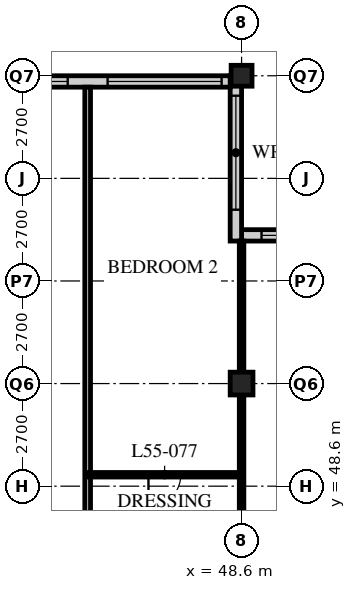
"""IFC4 building model, lengths in metres.
Left out: names, types, materials, properties, quantities, classifications, styles, units other than length and angle.
Written with IfcOpenShell. Run it as: python <this file> out.ifc"""

import sys

from ifc_helpers import new_model, si_unit, direction, frame, frame_2d, origin, origin_2d, place, context, subcontext, project, spatial, rectangle, hollow_rectangle, extrude, element, fill, save


model = new_model("IFC4")
c1 = context("Model", 3, precision=1e-05, world=origin(), true_north=direction((0.0, 1.0)))
c2 = subcontext(c1, "Body", "Model", "MODEL_VIEW")
j1 = project(units=[si_unit("LENGTHUNIT", "METRE"), si_unit("PLANEANGLEUNIT", "RADIAN")], contexts=[c1])
p1 = place(None, origin())
s1 = spatial("IfcSite", under=j1, at=p1, CompositionType="ELEMENT")
p2 = place(p1, origin())
s2 = spatial("IfcBuilding", under=s1, at=p2, CompositionType="ELEMENT")
p3 = place(p2, frame((0.0, 0.0, 213.6)))
s3 = spatial("IfcBuildingStorey", under=s2, at=p3, CompositionType="ELEMENT", Elevation=213.6)
p4 = place(p3, frame((48.6, 51.3, 0.0), z_axis=(0.0, 0.0, 1.0), x_axis=(1.0, 0.0, 0.0)))
e1 = element("IfcColumn", 1, at=p4, inside=s3, PredefinedType="COLUMN", context=c2, shape_type="SweptSolid", body=[
    extrude(hollow_rectangle(XDim=0.6, YDim=0.6, WallThickness=0.05, at=origin_2d()), origin(), (0.0, 0.0, 1.0), 3.6),
])
p5 = place(p3, frame((48.6, 59.4, 0.0), z_axis=(0.0, 0.0, 1.0), x_axis=(1.0, 0.0, 0.0)))
e2 = element("IfcColumn", 2, at=p5, inside=s3, PredefinedType="COLUMN", context=c2, shape_type="SweptSolid", body=[
    extrude(hollow_rectangle(XDim=0.55, YDim=0.55, WallThickness=0.045, at=origin_2d()), origin(), (0.0, 0.0, 1.0), 3.6),
])
p6 = place(p3, frame((52.35, 55.2, 0.0), z_axis=(0.0, 0.0, 1.0), x_axis=(-1.0, 0.0, 0.0)))
e3 = element("IfcWall", 3, at=p6, inside=s3, PredefinedType="SOLIDWALL", context=c2, shape_type="SweptSolid", body=[
    extrude(rectangle(XDim=3.75, YDim=0.3, at=frame_2d((1.875, 0.0))), origin(), (0.0, 0.0, 1.0), 3.39),
])
p7 = place(p6, frame((0.225, 0.0, 0.6)))
e4 = element("IfcOpeningElement", 4, at=p7, cuts=e3, PredefinedType="OPENING", context=c2, shape_type="SweptSolid", body=[
    extrude(rectangle(XDim=3.0, YDim=2.0, at=frame_2d((1.5, 1.0))), frame((0.0, 0.16, 0.0), z_axis=(0.0, -1.0, 0.0), x_axis=(1.0, 0.0, 0.0)), (0.0, 0.0, 1.0), 0.32),
])
p8 = place(p3, frame((48.45, 55.05, 0.0), z_axis=(0.0, 0.0, 1.0), x_axis=(0.0, 1.0, 0.0)))
e5 = element("IfcWall", 5, at=p8, inside=s3, PredefinedType="SOLIDWALL", context=c2, shape_type="SweptSolid", body=[
    extrude(rectangle(XDim=4.35, YDim=0.3, at=frame_2d((2.175, 0.0))), origin(), (0.0, 0.0, 1.0), 3.39),
])
p9 = place(p8, frame((0.825, 0.0, 0.6)))
e6 = element("IfcOpeningElement", 6, at=p9, cuts=e5, PredefinedType="OPENING", context=c2, shape_type="SweptSolid", body=[
    extrude(rectangle(XDim=3.0, YDim=2.0, at=frame_2d((1.5, 1.0))), frame((0.0, 0.16, 0.0), z_axis=(0.0, -1.0, 0.0), x_axis=(1.0, 0.0, 0.0)), (0.0, 0.0, 1.0), 0.32),
])
p10 = place(p3, frame((48.3, 59.25, 0.0), z_axis=(0.0, 0.0, 1.0), x_axis=(-1.0, 0.0, 0.0)))
e7 = element("IfcWall", 7, at=p10, inside=s3, PredefinedType="SOLIDWALL", context=c2, shape_type="SweptSolid", body=[
    extrude(rectangle(XDim=40.2, YDim=0.3, at=frame_2d((20.1, 0.0))), origin(), (0.0, 0.0, 1.0), 3.39),
])
p11 = place(p10, frame((0.225, 0.0, 0.6)))
e8 = element("IfcOpeningElement", 8, at=p11, cuts=e7, PredefinedType="OPENING", context=c2, shape_type="SweptSolid", body=[
    extrude(rectangle(XDim=3.0, YDim=2.4, at=frame_2d((1.5, 1.2))), frame((0.0, 0.16, 0.0), z_axis=(0.0, -1.0, 0.0), x_axis=(1.0, 0.0, 0.0)), (0.0, 0.0, 1.0), 0.32),
])
p12 = place(p10, frame((4.275, 0.0, 0.6)))
e9 = element("IfcOpeningElement", 9, at=p12, cuts=e7, PredefinedType="OPENING", context=c2, shape_type="SweptSolid", body=[
    extrude(rectangle(XDim=3.0, YDim=2.4, at=frame_2d((1.5, 1.2))), frame((0.0, 0.16, 0.0), z_axis=(0.0, -1.0, 0.0), x_axis=(1.0, 0.0, 0.0)), (0.0, 0.0, 1.0), 0.32),
])
p13 = place(p10, frame((8.325, 0.0, 0.6)))
e10 = element("IfcOpeningElement", 10, at=p13, cuts=e7, PredefinedType="OPENING", context=c2, shape_type="SweptSolid", body=[
    extrude(rectangle(XDim=3.0, YDim=2.4, at=frame_2d((1.5, 1.2))), frame((0.0, 0.16, 0.0), z_axis=(0.0, -1.0, 0.0), x_axis=(1.0, 0.0, 0.0)), (0.0, 0.0, 1.0), 0.32),
])
p14 = place(p10, frame((12.375, 0.0, 0.6)))
e11 = element("IfcOpeningElement", 11, at=p14, cuts=e7, PredefinedType="OPENING", context=c2, shape_type="SweptSolid", body=[
    extrude(rectangle(XDim=3.0, YDim=2.4, at=frame_2d((1.5, 1.2))), frame((0.0, 0.16, 0.0), z_axis=(0.0, -1.0, 0.0), x_axis=(1.0, 0.0, 0.0)), (0.0, 0.0, 1.0), 0.32),
])
p15 = place(p10, frame((16.425, 0.0, 0.6)))
e12 = element("IfcOpeningElement", 12, at=p15, cuts=e7, PredefinedType="OPENING", context=c2, shape_type="SweptSolid", body=[
    extrude(rectangle(XDim=3.0, YDim=2.4, at=frame_2d((1.5, 1.2))), frame((0.0, 0.16, 0.0), z_axis=(0.0, -1.0, 0.0), x_axis=(1.0, 0.0, 0.0)), (0.0, 0.0, 1.0), 0.32),
])
p16 = place(p10, frame((20.475, 0.0, 0.6)))
e13 = element("IfcOpeningElement", 13, at=p16, cuts=e7, PredefinedType="OPENING", context=c2, shape_type="SweptSolid", body=[
    extrude(rectangle(XDim=3.0, YDim=2.4, at=frame_2d((1.5, 1.2))), frame((0.0, 0.16, 0.0), z_axis=(0.0, -1.0, 0.0), x_axis=(1.0, 0.0, 0.0)), (0.0, 0.0, 1.0), 0.32),
])
p17 = place(p10, frame((24.525, 0.0, 0.6)))
e14 = element("IfcOpeningElement", 14, at=p17, cuts=e7, PredefinedType="OPENING", context=c2, shape_type="SweptSolid", body=[
    extrude(rectangle(XDim=3.0, YDim=2.4, at=frame_2d((1.5, 1.2))), frame((0.0, 0.16, 0.0), z_axis=(0.0, -1.0, 0.0), x_axis=(1.0, 0.0, 0.0)), (0.0, 0.0, 1.0), 0.32),
])
p18 = place(p10, frame((28.575, 0.0, 0.6)))
e15 = element("IfcOpeningElement", 15, at=p18, cuts=e7, PredefinedType="OPENING", context=c2, shape_type="SweptSolid", body=[
    extrude(rectangle(XDim=3.0, YDim=2.4, at=frame_2d((1.5, 1.2))), frame((0.0, 0.16, 0.0), z_axis=(0.0, -1.0, 0.0), x_axis=(1.0, 0.0, 0.0)), (0.0, 0.0, 1.0), 0.32),
])
p19 = place(p10, frame((32.625, 0.0, 0.6)))
e16 = element("IfcOpeningElement", 16, at=p19, cuts=e7, PredefinedType="OPENING", context=c2, shape_type="SweptSolid", body=[
    extrude(rectangle(XDim=3.0, YDim=2.4, at=frame_2d((1.5, 1.2))), frame((0.0, 0.16, 0.0), z_axis=(0.0, -1.0, 0.0), x_axis=(1.0, 0.0, 0.0)), (0.0, 0.0, 1.0), 0.32),
])
p20 = place(p10, frame((36.675, 0.0, 0.6)))
e17 = element("IfcOpeningElement", 17, at=p20, cuts=e7, PredefinedType="OPENING", context=c2, shape_type="SweptSolid", body=[
    extrude(rectangle(XDim=3.0, YDim=2.4, at=frame_2d((1.5, 1.2))), frame((0.0, 0.16, 0.0), z_axis=(0.0, -1.0, 0.0), x_axis=(1.0, 0.0, 0.0)), (0.0, 0.0, 1.0), 0.32),
])
p21 = place(p3, frame((48.6, 45.6, 0.0), z_axis=(0.0, 0.0, 1.0), x_axis=(0.0, 1.0, 0.0)))
e18 = element("IfcWall", 18, at=p21, inside=s3, PredefinedType="PARTITIONING", context=c2, shape_type="SweptSolid", body=[
    extrude(rectangle(XDim=9.45, YDim=0.12, at=frame_2d((4.725, 0.0))), origin(), (0.0, 0.0, 1.0), 2.778),
])
p22 = place(p3, frame((44.55, 43.2, 0.0), z_axis=(0.0, 0.0, 1.0), x_axis=(0.0, 1.0, 0.0)))
e19 = element("IfcWall", 19, at=p22, inside=s3, PredefinedType="PARTITIONING", context=c2, shape_type="SweptSolid", body=[
    extrude(rectangle(XDim=15.9, YDim=0.15, at=frame_2d((7.95, 0.0))), origin(), (0.0, 0.0, 1.0), 3.39),
])
p23 = place(p3, frame((44.55, 48.9, 0.0), z_axis=(0.0, 0.0, 1.0), x_axis=(1.0, 0.0, 0.0)))
e20 = element("IfcWall", 20, at=p23, inside=s3, PredefinedType="PARTITIONING", context=c2, shape_type="SweptSolid", body=[
    extrude(rectangle(XDim=4.05, YDim=0.12, at=frame_2d((2.025, 0.0))), origin(), (0.0, 0.0, 1.0), 3.39),
])
p24 = place(p23, frame((1.6, 0.0, 0.0)))
e21 = element("IfcOpeningElement", 21, at=p24, cuts=e20, PredefinedType="OPENING", context=c2, shape_type="SweptSolid", body=[
    extrude(rectangle(XDim=0.85, YDim=2.1, at=frame_2d((0.425, 1.05))), frame((0.0, 0.07, 0.0), z_axis=(0.0, -1.0, 0.0), x_axis=(1.0, 0.0, 0.0)), (0.0, 0.0, 1.0), 0.14),
])
p25 = place(p7, origin())
e22 = element("IfcWindow", 22, at=p25, inside=s3, PartitioningType="SINGLE_PANEL", PredefinedType="WINDOW", context=c2, shape_type="SweptSolid", body=[
    extrude(rectangle(XDim=3.0, YDim=2.0, at=frame_2d((1.5, 1.0))), frame((0.0, 0.03, 0.0), z_axis=(0.0, -1.0, 0.0), x_axis=(1.0, 0.0, 0.0)), (0.0, 0.0, 1.0), 0.06),
])
fill(e4, e22)
p26 = place(p9, origin())
e23 = element("IfcWindow", 23, at=p26, inside=s3, PartitioningType="SINGLE_PANEL", PredefinedType="WINDOW", context=c2, shape_type="SweptSolid", body=[
    extrude(rectangle(XDim=3.0, YDim=2.0, at=frame_2d((1.5, 1.0))), frame((0.0, 0.03, 0.0), z_axis=(0.0, -1.0, 0.0), x_axis=(1.0, 0.0, 0.0)), (0.0, 0.0, 1.0), 0.06),
])
fill(e6, e23)
p27 = place(p11, origin())
e24 = element("IfcWindow", 24, at=p27, inside=s3, PartitioningType="SINGLE_PANEL", PredefinedType="WINDOW", context=c2, shape_type="SweptSolid", body=[
    extrude(rectangle(XDim=3.0, YDim=2.4, at=frame_2d((1.5, 1.2))), frame((0.0, 0.03, 0.0), z_axis=(0.0, -1.0, 0.0), x_axis=(1.0, 0.0, 0.0)), (0.0, 0.0, 1.0), 0.06),
])
fill(e8, e24)
p28 = place(p12, origin())
e25 = element("IfcWindow", 25, at=p28, inside=s3, PartitioningType="SINGLE_PANEL", PredefinedType="WINDOW", context=c2, shape_type="SweptSolid", body=[
    extrude(rectangle(XDim=3.0, YDim=2.4, at=frame_2d((1.5, 1.2))), frame((0.0, 0.03, 0.0), z_axis=(0.0, -1.0, 0.0), x_axis=(1.0, 0.0, 0.0)), (0.0, 0.0, 1.0), 0.06),
])
fill(e9, e25)
p29 = place(p24, origin())
e26 = element("IfcDoor", 26, at=p29, inside=s3, OperationType="SINGLE_SWING_RIGHT", PredefinedType="DOOR", context=c2, shape_type="SweptSolid", body=[
    extrude(rectangle(XDim=0.85, YDim=2.1, at=frame_2d((0.425, 1.05))), frame((0.0, 0.025, 0.0), z_axis=(0.0, -1.0, 0.0), x_axis=(1.0, 0.0, 0.0)), (0.0, 0.0, 1.0), 0.05),
])
fill(e21, e26)
save(model, sys.argv[1])
